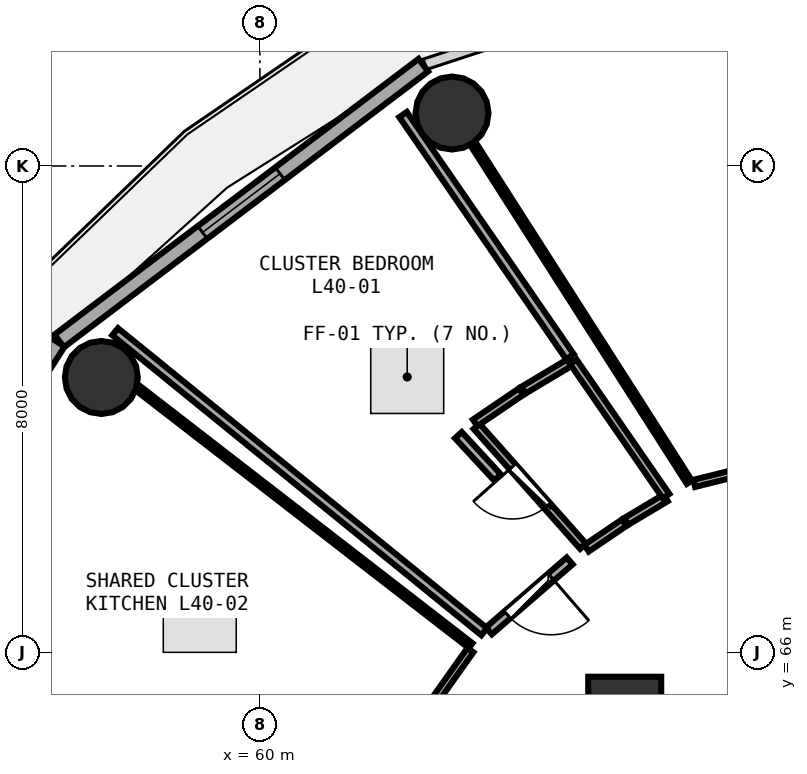
"""IFC4 building model, lengths in metres.
Left out: names, types, materials, properties, quantities, classifications, styles, units other than length and angle.
Written with IfcOpenShell. Run it as: python <this file> out.ifc"""

import sys

from ifc_helpers import new_model, si_unit, direction, frame, frame_2d, origin, origin_2d, place, context, subcontext, project, spatial, rectangle, circle, extrude, element, fill, save


model = new_model("IFC4")
c1 = context("Model", 3, precision=1e-05, world=origin(), true_north=direction((0.0, 1.0)))
c2 = subcontext(c1, "Body", "Model", "MODEL_VIEW")
j1 = project(units=[si_unit("LENGTHUNIT", "METRE"), si_unit("PLANEANGLEUNIT", "RADIAN")], contexts=[c1])
p1 = place(None, origin())
s1 = spatial("IfcSite", under=j1, at=p1, CompositionType="ELEMENT")
p2 = place(p1, origin())
s2 = spatial("IfcBuilding", under=s1, at=p2, CompositionType="ELEMENT")
p3 = place(p2, frame((0.0, 0.0, 158.1)))
s3 = spatial("IfcBuildingStorey", under=s2, at=p3, CompositionType="ELEMENT", Elevation=158.1)
p4 = place(p3, frame((66.0, 65.0, 0.0), z_axis=(0.0, 0.0, 1.0), x_axis=(1.0, 0.0, 0.0)))
e1 = element("IfcColumn", 1, at=p4, inside=s3, PredefinedType="PILASTER", context=c2, shape_type="SweptSolid", body=[
    extrude(rectangle(XDim=1.2, YDim=1.2, at=origin_2d()), origin(), (0.0, 0.0, 1.0), 3.75),
])
for number, where, z_axis, x_axis in (
    (2, (63.16, 74.87, 0.0), (0.0, 0.0, 1.0), (1.0, 0.0, 0.0)),
    (3, (57.392, 70.521, 0.0), (0.0, 0.0, 1.0), (1.0, 0.0, 0.0)),
):
    element("IfcColumn", number, at=place(p3, frame(where, z_axis=z_axis, x_axis=x_axis)), inside=s3, PredefinedType="COLUMN", context=c2, shape_type="SweptSolid", body=[
        extrude(circle(Radius=0.6, at=origin_2d()), origin(), (0.0, 0.0, 1.0), 3.75),
    ])
p5 = place(p3, frame((62.688, 75.658, 0.0), z_axis=(0.0, 0.0, 1.0), x_axis=(-0.797163719609, -0.603763202042, 0.0)))
e4 = element("IfcWall", 4, at=p5, inside=s3, PredefinedType="SOLIDWALL", context=c2, shape_type="SweptSolid", body=[
    extrude(rectangle(XDim=7.512, YDim=0.26, at=frame_2d((3.756, 0.0))), origin(), (0.0, 0.0, 1.0), 3.475),
])
p6 = place(p5, frame((2.956, 0.0, 0.85)))
e5 = element("IfcOpeningElement", 5, at=p6, cuts=e4, PredefinedType="OPENING", context=c2, shape_type="SweptSolid", body=[
    extrude(rectangle(XDim=1.6, YDim=1.45, at=frame_2d((0.8, 0.725))), frame((0.0, 0.14, 0.0), z_axis=(0.0, -1.0, 0.0), x_axis=(1.0, 0.0, 0.0)), (0.0, 0.0, 1.0), 0.28),
])
p7 = place(p3, frame((56.679, 71.1, 0.0), z_axis=(0.0, 0.0, 1.0), x_axis=(-0.538801521808, -0.842432739213, 0.0)))
e6 = element("IfcWall", 6, at=p7, inside=s3, PredefinedType="SOLIDWALL", context=c2, shape_type="SweptSolid", body=[
    extrude(rectangle(XDim=7.253, YDim=0.26, at=frame_2d((3.627, 0.0))), origin(), (0.0, 0.0, 1.0), 3.475),
])
p8 = place(p7, frame((3.152, 0.0, 0.0)))
e7 = element("IfcOpeningElement", 7, at=p8, cuts=e6, PredefinedType="OPENING", context=c2, shape_type="SweptSolid", body=[
    extrude(rectangle(XDim=0.95, YDim=2.1, at=frame_2d((0.475, 1.05))), frame((0.0, 0.14, 0.0), z_axis=(0.0, -1.0, 0.0), x_axis=(1.0, 0.0, 0.0)), (0.0, 0.0, 1.0), 0.28),
])
p9 = place(p7, frame((1.572, 0.0, 0.85)))
e8 = element("IfcOpeningElement", 8, at=p9, cuts=e6, PredefinedType="OPENING", context=c2, shape_type="SweptSolid", body=[
    extrude(rectangle(XDim=1.2, YDim=1.45, at=frame_2d((0.6, 0.725))), frame((0.0, 0.14, 0.0), z_axis=(0.0, -1.0, 0.0), x_axis=(1.0, 0.0, 0.0)), (0.0, 0.0, 1.0), 0.28),
])
p10 = place(p3, frame((73.701, 70.414, 0.0), z_axis=(0.0, 0.0, 1.0), x_axis=(-0.970327101986, -0.241796019718, 0.0)))
e9 = element("IfcWall", 9, at=p10, inside=s3, PredefinedType="PARTITIONING", context=c2, shape_type="SweptSolid", body=[
    extrude(rectangle(XDim=6.758, YDim=0.12, at=frame_2d((3.379, 0.0))), origin(), (0.0, 0.0, 1.0), 2.975),
])
p11 = place(p10, frame((2.929, 0.0, 0.0)))
e10 = element("IfcOpeningElement", 10, at=p11, cuts=e9, PredefinedType="OPENING", context=c2, shape_type="SweptSolid", body=[
    extrude(rectangle(XDim=0.9, YDim=2.08, at=frame_2d((0.45, 1.04))), frame((0.0, 0.07, 0.0), z_axis=(0.0, -1.0, 0.0), x_axis=(1.0, 0.0, 0.0)), (0.0, 0.0, 1.0), 0.14),
])
p12 = place(p3, frame((65.315, 67.747, 0.0), z_axis=(0.0, 0.0, 1.0), x_axis=(-0.664185753234, 0.74756757902, 0.0)))
e11 = element("IfcWall", 11, at=p12, inside=s3, PredefinedType="PLUMBINGWALL", context=c2, shape_type="SweptSolid", body=[
    extrude(rectangle(XDim=2.638, YDim=0.13, at=frame_2d((1.319, 0.0))), origin(), (0.0, 0.0, 1.0), 2.975),
])
p13 = place(p12, frame((0.889, 0.0, 0.0)))
e12 = element("IfcOpeningElement", 12, at=p13, cuts=e11, PredefinedType="OPENING", context=c2, shape_type="SweptSolid", body=[
    extrude(rectangle(XDim=0.86, YDim=2.05, at=frame_2d((0.43, 1.025))), frame((0.0, 0.075, 0.0), z_axis=(0.0, -1.0, 0.0), x_axis=(1.0, 0.0, 0.0)), (0.0, 0.0, 1.0), 0.15),
])
p14 = place(p3, frame((65.094, 67.505, 0.0), z_axis=(0.0, 0.0, 1.0), x_axis=(-0.756110527693, -0.654443939472, 0.0)))
e13 = element("IfcWall", 13, at=p14, inside=s3, PredefinedType="PARTITIONING", context=c2, shape_type="SweptSolid", body=[
    extrude(rectangle(XDim=1.758, YDim=0.15, at=frame_2d((0.879, 0.0))), origin(), (0.0, 0.0, 1.0), 2.975),
])
p15 = place(p14, frame((0.404, 0.0, 0.0)))
e14 = element("IfcOpeningElement", 14, at=p15, cuts=e13, PredefinedType="OPENING", context=c2, shape_type="SweptSolid", body=[
    extrude(rectangle(XDim=0.95, YDim=2.08, at=frame_2d((0.475, 1.04))), frame((0.0, 0.085, 0.0), z_axis=(0.0, -1.0, 0.0), x_axis=(1.0, 0.0, 0.0)), (0.0, 0.0, 1.0), 0.17),
])
p16 = place(p3, frame((63.462, 66.038, 0.0), z_axis=(0.0, 0.0, 1.0), x_axis=(-0.578762045024, -0.815496471629, 0.0)))
e15 = element("IfcWall", 15, at=p16, inside=s3, PredefinedType="PARTITIONING", context=c2, shape_type="SweptSolid", body=[
    extrude(rectangle(XDim=3.483, YDim=0.12, at=frame_2d((1.741, 0.0))), origin(), (0.0, 0.0, 1.0), 2.975),
])
p17 = place(p16, frame((1.291, 0.0, 0.0)))
e16 = element("IfcOpeningElement", 16, at=p17, cuts=e15, PredefinedType="OPENING", context=c2, shape_type="SweptSolid", body=[
    extrude(rectangle(XDim=0.9, YDim=2.08, at=frame_2d((0.45, 1.04))), frame((0.0, 0.07, 0.0), z_axis=(0.0, -1.0, 0.0), x_axis=(1.0, 0.0, 0.0)), (0.0, 0.0, 1.0), 0.14),
])
p18 = place(p3, frame((67.063, 68.799, 0.0), z_axis=(0.0, 0.0, 1.0), x_axis=(-0.538644897025, 0.842532892479, 0.0)))
e17 = element("IfcWall", 17, at=p18, inside=s3, PredefinedType="PARTITIONING", context=c2, shape_type="SweptSolid", body=[
    extrude(rectangle(XDim=6.594, YDim=0.1, at=frame_2d((3.297, 0.0))), origin(), (0.0, 0.0, 1.0), 3.175),
])
p19 = place(p3, frame((66.675, 68.543, 0.0), z_axis=(0.0, 0.0, 1.0), x_axis=(-0.85851758599, -0.5127841208, 0.0)))
e18 = element("IfcWall", 18, at=p19, inside=s3, PredefinedType="PLUMBINGWALL", context=c2, shape_type="SweptSolid", body=[
    extrude(rectangle(XDim=0.756, YDim=0.13, at=frame_2d((0.378, 0.0))), origin(), (0.0, 0.0, 1.0), 3.48),
])
p20 = place(p3, frame((65.992, 68.134, 0.0), z_axis=(0.0, 0.0, 1.0), x_axis=(-0.82786992474, -0.560920125964, 0.0)))
e19 = element("IfcWall", 19, at=p20, inside=s3, PredefinedType="PLUMBINGWALL", context=c2, shape_type="SweptSolid", body=[
    extrude(rectangle(XDim=0.75, YDim=0.13, at=frame_2d((0.375, 0.0))), origin(), (0.0, 0.0, 1.0), 2.975),
])
p21 = place(p3, frame((63.54, 69.775, 0.0), z_axis=(0.0, 0.0, 1.0), x_axis=(0.827440475962, 0.561553433558, 0.0)))
e20 = element("IfcWall", 20, at=p21, inside=s3, PredefinedType="PLUMBINGWALL", context=c2, shape_type="SweptSolid", body=[
    extrude(rectangle(XDim=0.918, YDim=0.13, at=frame_2d((0.459, 0.0))), origin(), (0.0, 0.0, 1.0), 2.975),
])
p22 = place(p3, frame((64.333, 70.312, 0.0), z_axis=(0.0, 0.0, 1.0), x_axis=(0.858494754448, 0.512822344077, 0.0)))
e21 = element("IfcWall", 21, at=p22, inside=s3, PredefinedType="PLUMBINGWALL", context=c2, shape_type="SweptSolid", body=[
    extrude(rectangle(XDim=0.923, YDim=0.13, at=frame_2d((0.461, 0.0))), origin(), (0.0, 0.0, 1.0), 2.975),
])
p23 = place(p3, frame((65.154, 70.78, 0.0), z_axis=(0.0, 0.0, 1.0), x_axis=(0.568302093988, -0.822819986369, 0.0)))
e22 = element("IfcWall", 22, at=p23, inside=s3, PredefinedType="PLUMBINGWALL", context=c2, shape_type="SweptSolid", body=[
    extrude(rectangle(XDim=2.686, YDim=0.13, at=frame_2d((1.343, 0.0))), origin(), (0.0, 0.0, 1.0), 3.235),
])
p24 = place(p3, frame((63.689, 66.34, 0.0), z_axis=(0.0, 0.0, 1.0), x_axis=(-0.77600992695, 0.630720693553, 0.0)))
e23 = element("IfcWall", 23, at=p24, inside=s3, PredefinedType="PARTITIONING", context=c2, shape_type="SweptSolid", body=[
    extrude(rectangle(XDim=7.822, YDim=0.15, at=frame_2d((3.911, 0.0))), origin(), (0.0, 0.0, 1.0), 2.975),
])
p25 = place(p3, frame((62.355, 74.845, 0.0), z_axis=(0.0, 0.0, 1.0), x_axis=(0.56747106095, -0.823393341596, 0.0)))
e24 = element("IfcWall", 24, at=p25, inside=s3, PredefinedType="PARTITIONING", context=c2, shape_type="SweptSolid", body=[
    extrude(rectangle(XDim=4.837, YDim=0.15, at=frame_2d((2.418, 0.0))), origin(), (0.0, 0.0, 1.0), 2.975),
])
p26 = place(p3, frame((63.264, 69.573, 0.0), z_axis=(0.0, 0.0, 1.0), x_axis=(0.678771543933, -0.734349502041, 0.0)))
e25 = element("IfcWall", 25, at=p26, inside=s3, PredefinedType="PARTITIONING", context=c2, shape_type="SweptSolid", body=[
    extrude(rectangle(XDim=0.949, YDim=0.15, at=frame_2d((0.474, 0.0))), origin(), (0.0, 0.0, 1.0), 3.48),
])
p27 = place(p3, frame((61.375, 63.164, 0.0), z_axis=(0.0, 0.0, 1.0), x_axis=(-0.924943940784, 0.380103546953, 0.0)))
e26 = element("IfcWall", 26, at=p27, inside=s3, PredefinedType="PARTITIONING", context=c2, shape_type="SweptSolid", body=[
    extrude(rectangle(XDim=8.038, YDim=0.1, at=frame_2d((4.019, 0.0))), origin(), (0.0, 0.0, 1.0), 2.975),
])
p28 = place(p3, frame((57.992, 70.346, 0.0), z_axis=(0.0, 0.0, 1.0), x_axis=(0.790939607083, -0.611894221207, 0.0)))
e27 = element("IfcWall", 27, at=p28, inside=s3, PredefinedType="PARTITIONING", context=c2, shape_type="SweptSolid", body=[
    extrude(rectangle(XDim=6.92, YDim=0.1, at=frame_2d((3.46, 0.0))), origin(), (0.0, 0.0, 1.0), 2.975),
])
p29 = place(p3, frame((53.723, 65.777, 0.0), z_axis=(0.0, 0.0, 1.0), x_axis=(0.933303856141, -0.359087610636, 0.0)))
e28 = element("IfcWall", 28, at=p29, inside=s3, PredefinedType="PARTITIONING", context=c2, shape_type="SweptSolid", body=[
    extrude(rectangle(XDim=5.125, YDim=0.15, at=frame_2d((2.562, 0.0))), origin(), (0.0, 0.0, 1.0), 2.975),
])
p30 = place(p6, origin())
e29 = element("IfcWindow", 29, at=p30, inside=s3, PartitioningType="SINGLE_PANEL", PredefinedType="WINDOW", context=c2, shape_type="SweptSolid", body=[
    extrude(rectangle(XDim=1.6, YDim=1.45, at=frame_2d((0.8, 0.725))), frame((0.0, 0.03, 0.0), z_axis=(0.0, -1.0, 0.0), x_axis=(1.0, 0.0, 0.0)), (0.0, 0.0, 1.0), 0.06),
])
fill(e5, e29)
p31 = place(p13, origin())
e30 = element("IfcDoor", 30, at=p31, inside=s3, OperationType="SINGLE_SWING_RIGHT", PredefinedType="DOOR", context=c2, shape_type="SweptSolid", body=[
    extrude(rectangle(XDim=0.86, YDim=2.05, at=frame_2d((0.43, 1.025))), frame((0.0, 0.025, 0.0), z_axis=(0.0, -1.0, 0.0), x_axis=(1.0, 0.0, 0.0)), (0.0, 0.0, 1.0), 0.05),
])
fill(e12, e30)
p32 = place(p15, origin())
e31 = element("IfcDoor", 31, at=p32, inside=s3, OperationType="SINGLE_SWING_LEFT", PredefinedType="DOOR", context=c2, shape_type="SweptSolid", body=[
    extrude(rectangle(XDim=0.95, YDim=2.08, at=frame_2d((0.475, 1.04))), frame((0.0, 0.025, 0.0), z_axis=(0.0, -1.0, 0.0), x_axis=(1.0, 0.0, 0.0)), (0.0, 0.0, 1.0), 0.05),
])
fill(e14, e31)
save(model, sys.argv[1])
